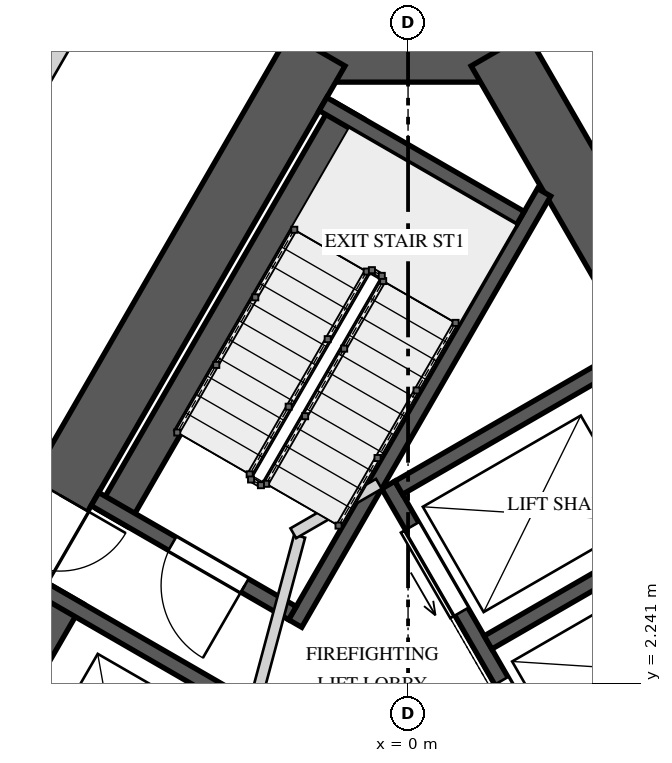
"""IFC4 building model, lengths in metres.
Left out: names, types, materials, properties, quantities, classifications, styles, units other than length and angle.
Written with IfcOpenShell. Run it as: python <this file> out.ifc"""

import sys

from ifc_helpers import new_model, si_unit, direction, frame, frame_2d, origin, place, context, subcontext, project, spatial, rectangle, extrude, element, fill, save


model = new_model("IFC4")
c1 = context("Model", 3, precision=1e-05, world=origin(), true_north=direction((0.0, 1.0)))
c2 = subcontext(c1, "Body", "Model", "MODEL_VIEW")
j1 = project(units=[si_unit("LENGTHUNIT", "METRE"), si_unit("PLANEANGLEUNIT", "RADIAN")], contexts=[c1])
p1 = place(None, origin())
s1 = spatial("IfcSite", under=j1, at=p1, CompositionType="ELEMENT")
p2 = place(p1, origin())
s2 = spatial("IfcBuilding", under=s1, at=p2, CompositionType="ELEMENT")
p3 = place(p2, frame((0.0, 0.0, 162.8)))
s3 = spatial("IfcBuildingStorey", under=s2, at=p3, CompositionType="ELEMENT", Elevation=162.8)
p4 = place(p3, frame((1.443, 10.575, 0.0), z_axis=(0.0, 0.0, 1.0), x_axis=(-1.0, 0.0, 0.0)))
e1 = element("IfcWall", 1, at=p4, inside=s3, PredefinedType="SHEAR", context=c2, shape_type="SweptSolid", body=[
    extrude(rectangle(XDim=2.887, YDim=0.85, at=frame_2d((1.443, 0.0))), origin(), (0.0, 0.0, 1.0), 4.0),
])
p5 = place(p3, frame((-1.198, 10.575, 0.0), z_axis=(0.0, 0.0, 1.0), x_axis=(-0.499995289315, -0.866028123483, 0.0)))
e2 = element("IfcWall", 2, at=p5, inside=s3, PredefinedType="SHEAR", context=c2, shape_type="SweptSolid", body=[
    extrude(rectangle(XDim=17.118, YDim=0.85, at=frame_2d((8.559, 0.0))), origin(), (0.0, 0.0, 1.0), 4.0),
])
p6 = place(p5, frame((6.764, 0.0, 0.0)))
e3 = element("IfcOpeningElement", 3, at=p6, cuts=e2, PredefinedType="OPENING", context=c2, shape_type="SweptSolid", body=[
    extrude(rectangle(XDim=1.0, YDim=2.4, at=frame_2d((0.5, 1.2))), frame((0.0, 0.435, 0.0), z_axis=(0.0, -1.0, 0.0), x_axis=(1.0, 0.0, 0.0)), (0.0, 0.0, 1.0), 0.87),
])
p7 = place(p5, frame((14.742, 0.0, 0.0)))
e4 = element("IfcOpeningElement", 4, at=p7, cuts=e2, PredefinedType="OPENING", context=c2, shape_type="SweptSolid", body=[
    extrude(rectangle(XDim=0.8, YDim=2.1, at=frame_2d((0.4, 1.05))), frame((0.0, 0.435, 0.0), z_axis=(0.0, -1.0, 0.0), x_axis=(1.0, 0.0, 0.0)), (0.0, 0.0, 1.0), 0.87),
])
p8 = place(p3, frame((9.757, -4.25, 0.0), z_axis=(0.0, 0.0, 1.0), x_axis=(-0.499995289315, 0.866028123483, 0.0)))
e5 = element("IfcWall", 5, at=p8, inside=s3, PredefinedType="SHEAR", context=c2, shape_type="SweptSolid", body=[
    extrude(rectangle(XDim=17.118, YDim=0.85, at=frame_2d((8.559, 0.0))), origin(), (0.0, 0.0, 1.0), 4.0),
])
p9 = place(p8, frame((6.834, 0.0, 0.0)))
e6 = element("IfcOpeningElement", 6, at=p9, cuts=e5, PredefinedType="OPENING", context=c2, shape_type="SweptSolid", body=[
    extrude(rectangle(XDim=1.0, YDim=2.4, at=frame_2d((0.5, 1.2))), frame((0.0, 0.435, 0.0), z_axis=(0.0, -1.0, 0.0), x_axis=(1.0, 0.0, 0.0)), (0.0, 0.0, 1.0), 0.87),
])
p10 = place(p3, frame((-0.788, 9.785, 0.0), z_axis=(0.0, 0.0, 1.0), x_axis=(-0.500009909098, -0.866019682689, 0.0)))
e7 = element("IfcWall", 7, at=p10, inside=s3, PredefinedType="SOLIDWALL", context=c2, shape_type="SweptSolid", body=[
    extrude(rectangle(XDim=6.2, YDim=0.45, at=frame_2d((3.1, 0.0))), origin(), (0.0, 0.0, 1.0), 3.65),
])
p11 = place(p3, frame((1.79, 8.7, 0.0), z_axis=(0.0, 0.0, 1.0), x_axis=(-0.499999959354, -0.866025427251, 0.0)))
e8 = element("IfcWall", 8, at=p11, inside=s3, PredefinedType="SOLIDWALL", context=c2, shape_type="SweptSolid", body=[
    extrude(rectangle(XDim=6.549, YDim=0.2, at=frame_2d((3.275, 0.0))), origin(), (0.0, 0.0, 1.0), 3.65),
])
p12 = place(p3, frame((1.479, 8.361, 0.0), z_axis=(0.0, 0.0, 1.0), x_axis=(-0.866031096941, 0.499990139034, 0.0)))
e9 = element("IfcWall", 9, at=p12, inside=s3, PredefinedType="SOLIDWALL", context=c2, shape_type="SweptSolid", body=[
    extrude(rectangle(XDim=3.0, YDim=0.2, at=frame_2d((1.5, 0.0))), origin(), (0.0, 0.0, 1.0), 3.65),
])
p13 = place(p3, frame((-1.521, 3.165, 0.0), z_axis=(0.0, 0.0, 1.0), x_axis=(-0.866031096941, 0.499990139034, 0.0)))
e10 = element("IfcWall", 10, at=p13, inside=s3, PredefinedType="SOLIDWALL", context=c2, shape_type="SweptSolid", body=[
    extrude(rectangle(XDim=3.0, YDim=0.2, at=frame_2d((1.5, 0.0))), origin(), (0.0, 0.0, 1.0), 3.65),
])
p14 = place(p13, frame((0.725, 0.0, 0.0)))
e11 = element("IfcOpeningElement", 11, at=p14, cuts=e10, PredefinedType="OPENING", context=c2, shape_type="SweptSolid", body=[
    extrude(rectangle(XDim=1.1, YDim=2.4, at=frame_2d((0.55, 1.2))), frame((0.0, 0.11, 0.0), z_axis=(0.0, -1.0, 0.0), x_axis=(1.0, 0.0, 0.0)), (0.0, 0.0, 1.0), 0.22),
])
p15 = place(p3, frame((-4.473, 3.402, 0.0), z_axis=(0.0, 0.0, 1.0), x_axis=(-0.499996545922, -0.866027397988, 0.0)))
e12 = element("IfcWall", 12, at=p15, inside=s3, PredefinedType="SOLIDWALL", context=c2, shape_type="SweptSolid", body=[
    extrude(rectangle(XDim=5.5, YDim=0.45, at=frame_2d((2.75, 0.0))), origin(), (0.0, 0.0, 1.0), 3.65),
])
p16 = place(p3, frame((-2.38, 2.078, 0.0), z_axis=(0.0, 0.0, 1.0), x_axis=(-0.866034573852, 0.49998411664, 0.0)))
e13 = element("IfcWall", 13, at=p16, inside=s3, PredefinedType="SOLIDWALL", context=c2, shape_type="SweptSolid", body=[
    extrude(rectangle(XDim=2.8, YDim=0.2, at=frame_2d((1.4, 0.0))), origin(), (0.0, 0.0, 1.0), 3.65),
])
p17 = place(p3, frame((2.19, 0.606, 0.0), z_axis=(0.0, 0.0, 1.0), x_axis=(-0.500002801628, 0.866023786258, 0.0)))
e14 = element("IfcWall", 14, at=p17, inside=s3, PredefinedType="SOLIDWALL", context=c2, shape_type="SweptSolid", body=[
    extrude(rectangle(XDim=4.9, YDim=0.2, at=frame_2d((2.45, 0.0))), origin(), (0.0, 0.0, 1.0), 3.65),
])
p18 = place(p17, frame((0.625, 0.0, 0.0)))
e15 = element("IfcOpeningElement", 15, at=p18, cuts=e14, PredefinedType="OPENING", context=c2, shape_type="SweptSolid", body=[
    extrude(rectangle(XDim=1.3, YDim=2.1, at=frame_2d((0.65, 1.05))), frame((0.0, 0.11, 0.0), z_axis=(0.0, -1.0, 0.0), x_axis=(1.0, 0.0, 0.0)), (0.0, 0.0, 1.0), 0.22),
])
p19 = place(p17, frame((2.975, 0.0, 0.0)))
e16 = element("IfcOpeningElement", 16, at=p19, cuts=e14, PredefinedType="OPENING", context=c2, shape_type="SweptSolid", body=[
    extrude(rectangle(XDim=1.3, YDim=2.1, at=frame_2d((0.65, 1.05))), frame((0.0, 0.11, 0.0), z_axis=(0.0, -1.0, 0.0), x_axis=(1.0, 0.0, 0.0)), (0.0, 0.0, 1.0), 0.22),
])
for number, where, z_axis, x_axis in (
    (17, (2.227, 0.743, 0.0), (0.0, 0.0, 1.0), (0.866, 0.5, 0.0)),
    (18, (1.052, 2.778, 0.0), (0.0, 0.0, 1.0), (0.866, 0.5, 0.0)),
    (19, (-0.123, 4.813, 0.0), (0.0, 0.0, 1.0), (0.866, 0.5, 0.0)),
):
    element("IfcWall", number, at=place(p3, frame(where, z_axis=z_axis, x_axis=x_axis)), inside=s3, PredefinedType="SOLIDWALL", context=c2, shape_type="SweptSolid", body=[
        extrude(rectangle(XDim=3.6, YDim=0.2, at=frame_2d((1.8, 0.0))), origin(), (0.0, 0.0, 1.0), 3.65),
    ])
p20 = place(p3, frame((-2.178, 1.372, 0.0), z_axis=(0.0, 0.0, 1.0), x_axis=(0.258808958833, 0.96592852884, 0.0)))
e20 = element("IfcWall", 20, at=p20, inside=s3, PredefinedType="PARTITIONING", context=c2, shape_type="SweptSolid", body=[
    extrude(rectangle(XDim=2.903, YDim=0.15, at=frame_2d((1.451, 0.0))), origin(), (0.0, 0.0, 1.0), 3.65),
])
p21 = place(p3, frame((-1.51, 4.215, 0.0), z_axis=(0.0, 0.0, 1.0), x_axis=(0.866085525409, 0.49989585183, 0.0)))
e21 = element("IfcWall", 21, at=p21, inside=s3, PredefinedType="PARTITIONING", context=c2, shape_type="SweptSolid", body=[
    extrude(rectangle(XDim=1.3, YDim=0.15, at=frame_2d((0.65, 0.0))), origin(), (0.0, 0.0, 1.0), 3.65),
])
p22 = place(p3, frame((-5.22, 9.458, 0.0), z_axis=(0.0, 0.0, 1.0), x_axis=(0.500031717574, 0.86600709086, 0.0)))
e22 = element("IfcWall", 22, at=p22, inside=s3, PredefinedType="SOLIDWALL", context=c2, shape_type="SweptSolid", body=[
    extrude(rectangle(XDim=1.572, YDim=0.2, at=frame_2d((0.786, 0.0))), origin(), (0.0, 0.0, 1.0), 3.65),
])
p23 = place(p14, origin())
e23 = element("IfcDoor", 23, at=p23, inside=s3, OperationType="SINGLE_SWING_RIGHT", PredefinedType="DOOR", context=c2, shape_type="SweptSolid", body=[
    extrude(rectangle(XDim=1.1, YDim=2.4, at=frame_2d((0.55, 1.2))), frame((0.0, 0.025, 0.0), z_axis=(0.0, -1.0, 0.0), x_axis=(1.0, 0.0, 0.0)), (0.0, 0.0, 1.0), 0.05),
])
fill(e11, e23)
p24 = place(p18, origin())
e24 = element("IfcDoor", 24, at=p24, inside=s3, OperationType="SLIDING_TO_RIGHT", PredefinedType="DOOR", context=c2, shape_type="SweptSolid", body=[
    extrude(rectangle(XDim=1.3, YDim=2.1, at=frame_2d((0.65, 1.05))), frame((0.0, 0.025, 0.0), z_axis=(0.0, -1.0, 0.0), x_axis=(1.0, 0.0, 0.0)), (0.0, 0.0, 1.0), 0.05),
])
fill(e15, e24)
p25 = place(p19, origin())
e25 = element("IfcDoor", 25, at=p25, inside=s3, OperationType="SLIDING_TO_LEFT", PredefinedType="DOOR", context=c2, shape_type="SweptSolid", body=[
    extrude(rectangle(XDim=1.3, YDim=2.1, at=frame_2d((0.65, 1.05))), frame((0.0, 0.025, 0.0), z_axis=(0.0, -1.0, 0.0), x_axis=(1.0, 0.0, 0.0)), (0.0, 0.0, 1.0), 0.05),
])
fill(e16, e25)
p26 = place(p6, origin())
e26 = element("IfcDoor", 26, at=p26, inside=s3, OperationType="SINGLE_SWING_LEFT", PredefinedType="DOOR", context=c2, shape_type="SweptSolid", body=[
    extrude(rectangle(XDim=1.0, YDim=2.4, at=frame_2d((0.5, 1.2))), frame((0.0, 0.025, 0.0), z_axis=(0.0, -1.0, 0.0), x_axis=(1.0, 0.0, 0.0)), (0.0, 0.0, 1.0), 0.05),
])
fill(e3, e26)
save(model, sys.argv[1])
